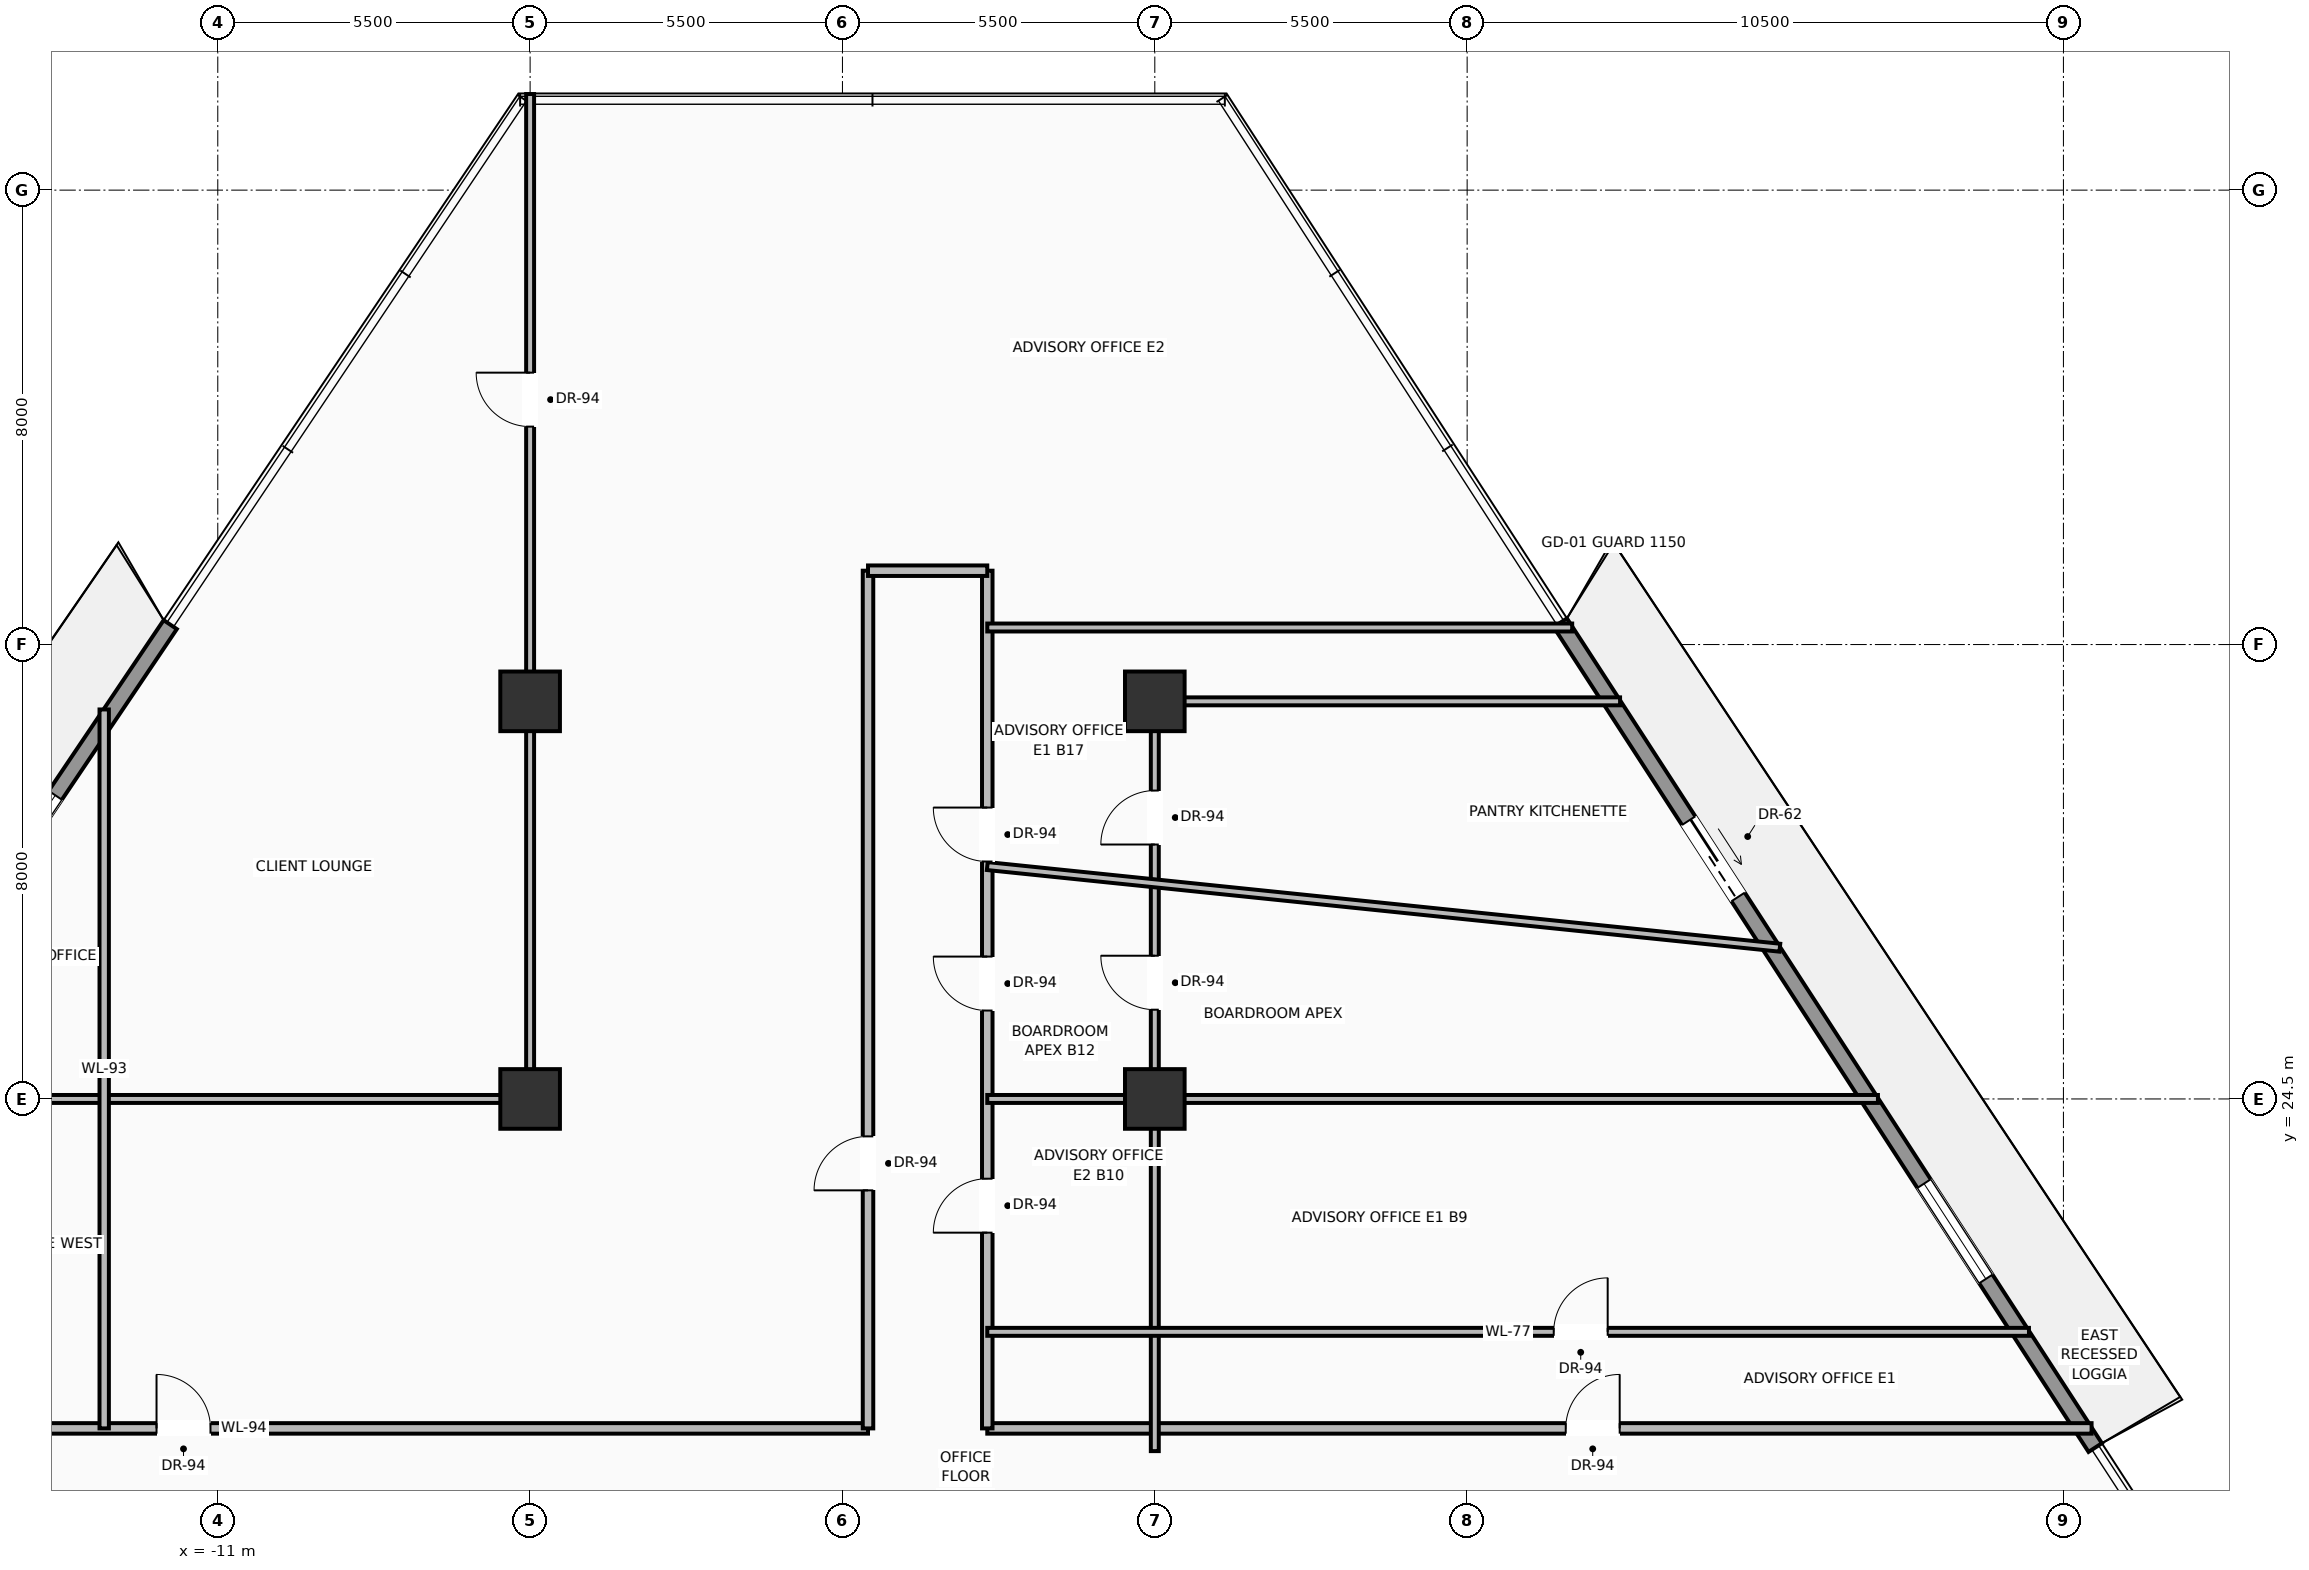
"""IFC4 building model, lengths in metres.
Left out: names, types, materials, properties, quantities, classifications, styles, units other than length and angle.
Written with IfcOpenShell. Run it as: python <this file> out.ifc"""

import sys

from ifc_helpers import new_model, si_unit, direction, frame, frame_2d, origin, origin_2d, place, context, subcontext, project, spatial, rectangle, extrude, source, transform, mapped, element, fill, save


model = new_model("IFC4")
c1 = context("Model", 3, precision=1e-05, world=origin(), true_north=direction((0.0, 1.0)))
c2 = subcontext(c1, "Body", "Model", "MODEL_VIEW")
j1 = project(units=[si_unit("LENGTHUNIT", "METRE"), si_unit("PLANEANGLEUNIT", "RADIAN")], contexts=[c1])
p1 = place(None, origin())
s1 = spatial("IfcSite", under=j1, at=p1, CompositionType="ELEMENT")
p2 = place(p1, origin())
s2 = spatial("IfcBuilding", under=s1, at=p2, CompositionType="ELEMENT")
p3 = place(p2, frame((0.0, 0.0, 91.4)))
s3 = spatial("IfcBuildingStorey", under=s2, at=p3, CompositionType="ELEMENT", Elevation=91.4)
m1 = source(origin(), c2, "Body", "SweptSolid", [
    extrude(rectangle(XDim=1.05, YDim=1.05, at=origin_2d()), origin(), (0.0, 0.0, 1.0), 3.7),
])
for number, where, z_axis, x_axis in (
    (1, (-5.5, 24.5, 0.0), (0.0, 0.0, 1.0), (1.0, 0.0, 0.0)),
    (2, (5.5, 24.5, 0.0), (0.0, 0.0, 1.0), (1.0, 0.0, 0.0)),
    (3, (-5.5, 31.5, 0.0), (0.0, 0.0, 1.0), (1.0, 0.0, 0.0)),
    (4, (5.5, 31.5, 0.0), (0.0, 0.0, 1.0), (1.0, 0.0, 0.0)),
):
    element("IfcColumn", number, at=place(p3, frame(where, z_axis=z_axis, x_axis=x_axis)), inside=s3, PredefinedType="COLUMN", context=c2, shape_type="MappedRepresentation", body=[
        mapped(m1, transform((0.0, 0.0, 0.0), scale=1.0)),
    ])
p4 = place(p3, frame((-21.654, 18.279, 0.0), z_axis=(0.0, 0.0, 1.0), x_axis=(0.558730690693, 0.829349151611, 0.0)))
e5 = element("IfcWall", 5, at=p4, inside=s3, PredefinedType="SOLIDWALL", context=c2, shape_type="SweptSolid", body=[
    extrude(rectangle(XDim=17.57, YDim=0.28, at=frame_2d((8.785, 0.0))), origin(), (0.0, 0.0, 1.0), 3.03),
])
p5 = place(p4, frame((4.217, 0.0, 0.0)))
e6 = element("IfcOpeningElement", 6, at=p5, cuts=e5, PredefinedType="OPENING", context=c2, shape_type="SweptSolid", body=[
    extrude(rectangle(XDim=1.6, YDim=2.35, at=frame_2d((0.8, 1.175))), frame((0.0, 0.15, 0.0), z_axis=(0.0, -1.0, 0.0), x_axis=(1.0, 0.0, 0.0)), (0.0, 0.0, 1.0), 0.3),
])
p6 = place(p4, frame((11.948, 0.0, 0.9)))
e7 = element("IfcOpeningElement", 7, at=p6, cuts=e5, PredefinedType="OPENING", context=c2, shape_type="SweptSolid", body=[
    extrude(rectangle(XDim=2.0, YDim=1.85, at=frame_2d((1.0, 0.925))), frame((0.0, 0.15, 0.0), z_axis=(0.0, -1.0, 0.0), x_axis=(1.0, 0.0, 0.0)), (0.0, 0.0, 1.0), 0.3),
])
p7 = place(p3, frame((12.64, 32.885, 0.0), z_axis=(0.0, 0.0, 1.0), x_axis=(0.544185470626, -0.838964941794, 0.0)))
e8 = element("IfcWall", 8, at=p7, inside=s3, PredefinedType="SOLIDWALL", context=c2, shape_type="SweptSolid", body=[
    extrude(rectangle(XDim=17.31, YDim=0.28, at=frame_2d((8.655, 0.0))), origin(), (0.0, 0.0, 1.0), 3.03),
])
p8 = place(p7, frame((4.154, 0.0, 0.0)))
e9 = element("IfcOpeningElement", 9, at=p8, cuts=e8, PredefinedType="OPENING", context=c2, shape_type="SweptSolid", body=[
    extrude(rectangle(XDim=1.6, YDim=2.35, at=frame_2d((0.8, 1.175))), frame((0.0, 0.15, 0.0), z_axis=(0.0, -1.0, 0.0), x_axis=(1.0, 0.0, 0.0)), (0.0, 0.0, 1.0), 0.3),
])
p9 = place(p7, frame((11.771, 0.0, 0.9)))
e10 = element("IfcOpeningElement", 10, at=p9, cuts=e8, PredefinedType="OPENING", context=c2, shape_type="SweptSolid", body=[
    extrude(rectangle(XDim=2.0, YDim=1.85, at=frame_2d((1.0, 0.925))), frame((0.0, 0.15, 0.0), z_axis=(0.0, -1.0, 0.0), x_axis=(1.0, 0.0, 0.0)), (0.0, 0.0, 1.0), 0.3),
])
p10 = place(p3, frame((-21.527, 18.7, 0.0), z_axis=(0.0, 0.0, 1.0), x_axis=(1.0, 0.0, 0.0)))
e11 = element("IfcWall", 11, at=p10, inside=s3, PredefinedType="PARTITIONING", context=c2, shape_type="SweptSolid", body=[
    extrude(rectangle(XDim=21.977, YDim=0.185, at=frame_2d((10.989, 0.0))), origin(), (0.0, 0.0, 1.0), 2.747),
])
p11 = place(p10, frame((9.449, 0.0, 0.0)))
e12 = element("IfcOpeningElement", 12, at=p11, cuts=e11, PredefinedType="OPENING", context=c2, shape_type="SweptSolid", body=[
    extrude(rectangle(XDim=0.95, YDim=2.2, at=frame_2d((0.475, 1.1))), frame((0.0, 0.103, 0.0), z_axis=(0.0, -1.0, 0.0), x_axis=(1.0, 0.0, 0.0)), (0.0, 0.0, 1.0), 0.205),
])
p12 = place(p10, frame((4.144, 0.0, 0.0)))
e13 = element("IfcOpeningElement", 13, at=p12, cuts=e11, PredefinedType="OPENING", context=c2, shape_type="SweptSolid", body=[
    extrude(rectangle(XDim=0.95, YDim=2.2, at=frame_2d((0.475, 1.1))), frame((0.0, 0.103, 0.0), z_axis=(0.0, -1.0, 0.0), x_axis=(1.0, 0.0, 0.0)), (0.0, 0.0, 1.0), 0.205),
])
p13 = place(p3, frame((2.55, 18.7, 0.0), z_axis=(0.0, 0.0, 1.0), x_axis=(1.0, 0.0, 0.0)))
e14 = element("IfcWall", 14, at=p13, inside=s3, PredefinedType="PARTITIONING", context=c2, shape_type="SweptSolid", body=[
    extrude(rectangle(XDim=19.446, YDim=0.185, at=frame_2d((9.723, 0.0))), origin(), (0.0, 0.0, 1.0), 2.747),
])
p14 = place(p13, frame((10.186, 0.0, 0.0)))
e15 = element("IfcOpeningElement", 15, at=p14, cuts=e14, PredefinedType="OPENING", context=c2, shape_type="SweptSolid", body=[
    extrude(rectangle(XDim=0.95, YDim=2.2, at=frame_2d((0.475, 1.1))), frame((0.0, 0.103, 0.0), z_axis=(0.0, -1.0, 0.0), x_axis=(1.0, 0.0, 0.0)), (0.0, 0.0, 1.0), 0.205),
])
p15 = place(p3, frame((0.45, 18.7, 0.0), z_axis=(0.0, 0.0, 1.0), x_axis=(0.0, 1.0, 0.0)))
e16 = element("IfcWall", 16, at=p15, inside=s3, PredefinedType="PARTITIONING", context=c2, shape_type="SweptSolid", body=[
    extrude(rectangle(XDim=15.1, YDim=0.185, at=frame_2d((7.55, 0.0))), origin(), (0.0, 0.0, 1.0), 2.747),
])
p16 = place(p15, frame((4.191, 0.0, 0.0)))
e17 = element("IfcOpeningElement", 17, at=p16, cuts=e16, PredefinedType="OPENING", context=c2, shape_type="SweptSolid", body=[
    extrude(rectangle(XDim=0.95, YDim=2.2, at=frame_2d((0.475, 1.1))), frame((0.0, 0.103, 0.0), z_axis=(0.0, -1.0, 0.0), x_axis=(1.0, 0.0, 0.0)), (0.0, 0.0, 1.0), 0.205),
])
p17 = place(p3, frame((2.55, 18.7, 0.0), z_axis=(0.0, 0.0, 1.0), x_axis=(0.0, 1.0, 0.0)))
e18 = element("IfcWall", 18, at=p17, inside=s3, PredefinedType="PARTITIONING", context=c2, shape_type="SweptSolid", body=[
    extrude(rectangle(XDim=15.1, YDim=0.185, at=frame_2d((7.55, 0.0))), origin(), (0.0, 0.0, 1.0), 2.747),
])
p18 = place(p17, frame((9.98, 0.0, 0.0)))
e19 = element("IfcOpeningElement", 19, at=p18, cuts=e18, PredefinedType="OPENING", context=c2, shape_type="SweptSolid", body=[
    extrude(rectangle(XDim=0.95, YDim=2.2, at=frame_2d((0.475, 1.1))), frame((0.0, 0.103, 0.0), z_axis=(0.0, -1.0, 0.0), x_axis=(1.0, 0.0, 0.0)), (0.0, 0.0, 1.0), 0.205),
])
p19 = place(p17, frame((3.446, 0.0, 0.0)))
e20 = element("IfcOpeningElement", 20, at=p19, cuts=e18, PredefinedType="OPENING", context=c2, shape_type="SweptSolid", body=[
    extrude(rectangle(XDim=0.95, YDim=2.2, at=frame_2d((0.475, 1.1))), frame((0.0, 0.103, 0.0), z_axis=(0.0, -1.0, 0.0), x_axis=(1.0, 0.0, 0.0)), (0.0, 0.0, 1.0), 0.205),
])
p20 = place(p17, frame((7.356, 0.0, 0.0)))
e21 = element("IfcOpeningElement", 21, at=p20, cuts=e18, PredefinedType="OPENING", context=c2, shape_type="SweptSolid", body=[
    extrude(rectangle(XDim=0.95, YDim=2.2, at=frame_2d((0.475, 1.1))), frame((0.0, 0.103, 0.0), z_axis=(0.0, -1.0, 0.0), x_axis=(1.0, 0.0, 0.0)), (0.0, 0.0, 1.0), 0.205),
])
p21 = place(p3, frame((0.45, 33.8, 0.0), z_axis=(0.0, 0.0, 1.0), x_axis=(1.0, 0.0, 0.0)))
e22 = element("IfcWall", 22, at=p21, inside=s3, PredefinedType="PARTITIONING", context=c2, shape_type="SweptSolid", body=[
    extrude(rectangle(XDim=2.1, YDim=0.185, at=frame_2d((1.05, 0.0))), origin(), (0.0, 0.0, 1.0), 3.442),
])
p22 = place(p3, frame((-5.5, 24.5, 0.0), z_axis=(0.0, 0.0, 1.0), x_axis=(0.0, 1.0, 0.0)))
e23 = element("IfcWall", 23, at=p22, inside=s3, PredefinedType="PARTITIONING", context=c2, shape_type="SweptSolid", body=[
    extrude(rectangle(XDim=17.692, YDim=0.14, at=frame_2d((8.846, 0.0))), origin(), (0.0, 0.0, 1.0), 2.747),
])
p23 = place(p22, frame((11.837, 0.0, 0.0)))
e24 = element("IfcOpeningElement", 24, at=p23, cuts=e23, PredefinedType="OPENING", context=c2, shape_type="SweptSolid", body=[
    extrude(rectangle(XDim=0.95, YDim=2.2, at=frame_2d((0.475, 1.1))), frame((0.0, 0.08, 0.0), z_axis=(0.0, -1.0, 0.0), x_axis=(1.0, 0.0, 0.0)), (0.0, 0.0, 1.0), 0.16),
])
p24 = place(p3, frame((5.5, 18.3, 0.0), z_axis=(0.0, 0.0, 1.0), x_axis=(0.0, 1.0, 0.0)))
e25 = element("IfcWall", 25, at=p24, inside=s3, PredefinedType="PARTITIONING", context=c2, shape_type="SweptSolid", body=[
    extrude(rectangle(XDim=13.2, YDim=0.14, at=frame_2d((6.6, 0.0))), origin(), (0.0, 0.0, 1.0), 2.747),
])
p25 = place(p24, frame((10.679, 0.0, 0.0)))
e26 = element("IfcOpeningElement", 26, at=p25, cuts=e25, PredefinedType="OPENING", context=c2, shape_type="SweptSolid", body=[
    extrude(rectangle(XDim=0.95, YDim=2.2, at=frame_2d((0.475, 1.1))), frame((0.0, 0.08, 0.0), z_axis=(0.0, -1.0, 0.0), x_axis=(1.0, 0.0, 0.0)), (0.0, 0.0, 1.0), 0.16),
])
p26 = place(p24, frame((7.771, 0.0, 0.0)))
e27 = element("IfcOpeningElement", 27, at=p26, cuts=e25, PredefinedType="OPENING", context=c2, shape_type="SweptSolid", body=[
    extrude(rectangle(XDim=0.95, YDim=2.2, at=frame_2d((0.475, 1.1))), frame((0.0, 0.08, 0.0), z_axis=(0.0, -1.0, 0.0), x_axis=(1.0, 0.0, 0.0)), (0.0, 0.0, 1.0), 0.16),
])
p27 = place(p3, frame((-17.62, 24.5, 0.0), z_axis=(0.0, 0.0, 1.0), x_axis=(1.0, 0.0, 0.0)))
e28 = element("IfcWall", 28, at=p27, inside=s3, PredefinedType="PARTITIONING", context=c2, shape_type="SweptSolid", body=[
    extrude(rectangle(XDim=12.12, YDim=0.14, at=frame_2d((6.06, 0.0))), origin(), (0.0, 0.0, 1.0), 2.747),
])
p28 = place(p27, frame((2.181, 0.0, 0.0)))
e29 = element("IfcOpeningElement", 29, at=p28, cuts=e28, PredefinedType="OPENING", context=c2, shape_type="SweptSolid", body=[
    extrude(rectangle(XDim=0.95, YDim=2.2, at=frame_2d((0.475, 1.1))), frame((0.0, 0.08, 0.0), z_axis=(0.0, -1.0, 0.0), x_axis=(1.0, 0.0, 0.0)), (0.0, 0.0, 1.0), 0.16),
])
p29 = place(p3, frame((5.5, 31.5, 0.0), z_axis=(0.0, 0.0, 1.0), x_axis=(1.0, 0.0, 0.0)))
e30 = element("IfcWall", 30, at=p29, inside=s3, PredefinedType="PARTITIONING", context=c2, shape_type="SweptSolid", body=[
    extrude(rectangle(XDim=8.193, YDim=0.14, at=frame_2d((4.097, 0.0))), origin(), (0.0, 0.0, 1.0), 2.747),
])
p30 = place(p3, frame((2.55, 20.4, 0.0), z_axis=(0.0, 0.0, 1.0), x_axis=(1.0, 0.0, 0.0)))
e31 = element("IfcWall", 31, at=p30, inside=s3, PredefinedType="PARTITIONING", context=c2, shape_type="SweptSolid", body=[
    extrude(rectangle(XDim=18.343, YDim=0.14, at=frame_2d((9.171, 0.0))), origin(), (0.0, 0.0, 1.0), 2.747),
])
p31 = place(p30, frame((9.975, 0.0, 0.0)))
e32 = element("IfcOpeningElement", 32, at=p31, cuts=e31, PredefinedType="OPENING", context=c2, shape_type="SweptSolid", body=[
    extrude(rectangle(XDim=0.95, YDim=2.2, at=frame_2d((0.475, 1.1))), frame((0.0, 0.08, 0.0), z_axis=(0.0, -1.0, 0.0), x_axis=(1.0, 0.0, 0.0)), (0.0, 0.0, 1.0), 0.16),
])
p32 = place(p3, frame((2.55, 24.5, 0.0), z_axis=(0.0, 0.0, 1.0), x_axis=(1.0, 0.0, 0.0)))
e33 = element("IfcWall", 33, at=p32, inside=s3, PredefinedType="PARTITIONING", context=c2, shape_type="SweptSolid", body=[
    extrude(rectangle(XDim=15.683, YDim=0.14, at=frame_2d((7.842, 0.0))), origin(), (0.0, 0.0, 1.0), 2.747),
])
p33 = place(p3, frame((2.55, 28.6, 0.0), z_axis=(0.0, 0.0, 1.0), x_axis=(0.994737328003, -0.10245803179, 0.0)))
e34 = element("IfcWall", 34, at=p33, inside=s3, PredefinedType="PARTITIONING", context=c2, shape_type="SweptSolid", body=[
    extrude(rectangle(XDim=14.03, YDim=0.14, at=frame_2d((7.015, 0.0))), origin(), (0.0, 0.0, 1.0), 2.747),
])
p34 = place(p3, frame((2.55, 32.8, 0.0), z_axis=(0.0, 0.0, 1.0), x_axis=(1.0, 0.0, 0.0)))
e35 = element("IfcWall", 35, at=p34, inside=s3, PredefinedType="PARTITIONING", context=c2, shape_type="SweptSolid", body=[
    extrude(rectangle(XDim=10.3, YDim=0.14, at=frame_2d((5.15, 0.0))), origin(), (0.0, 0.0, 1.0), 2.747),
])
p35 = place(p3, frame((-13.0, 18.7, 0.0), z_axis=(0.0, 0.0, 1.0), x_axis=(0.0, 1.0, 0.0)))
e36 = element("IfcWall", 36, at=p35, inside=s3, PredefinedType="PARTITIONING", context=c2, shape_type="SweptSolid", body=[
    extrude(rectangle(XDim=12.657, YDim=0.165, at=frame_2d((6.329, 0.0))), origin(), (0.0, 0.0, 1.0), 2.747),
])
m2 = source(origin(), c2, "Body", "SweptSolid", [
    extrude(rectangle(XDim=2.0, YDim=1.85, at=frame_2d((1.0, 0.925))), frame((0.0, 0.03, 0.0), z_axis=(0.0, -1.0, 0.0), x_axis=(1.0, 0.0, 0.0)), (0.0, 0.0, 1.0), 0.06),
])
p36 = place(p6, origin())
e37 = element("IfcWindow", 37, at=p36, inside=s3, PartitioningType="SINGLE_PANEL", PredefinedType="WINDOW", context=c2, shape_type="MappedRepresentation", body=[
    mapped(m2, transform((0.0, 0.0, 0.0), scale=1.0)),
])
fill(e7, e37)
m3 = source(origin(), c2, "Body", "SweptSolid", [
    extrude(rectangle(XDim=1.6, YDim=2.35, at=frame_2d((0.8, 1.175))), frame((0.0, 0.025, 0.0), z_axis=(0.0, -1.0, 0.0), x_axis=(1.0, 0.0, 0.0)), (0.0, 0.0, 1.0), 0.05),
])
p37 = place(p8, origin())
e38 = element("IfcDoor", 38, at=p37, inside=s3, OperationType="SLIDING_TO_RIGHT", PredefinedType="DOOR", context=c2, shape_type="MappedRepresentation", body=[
    mapped(m3, transform((0.0, 0.0, 0.0), scale=1.0)),
])
fill(e9, e38)
p38 = place(p9, origin())
e39 = element("IfcWindow", 39, at=p38, inside=s3, PartitioningType="SINGLE_PANEL", PredefinedType="WINDOW", context=c2, shape_type="MappedRepresentation", body=[
    mapped(m2, transform((0.0, 0.0, 0.0), scale=1.0)),
])
fill(e10, e39)
m4 = source(origin(), c2, "Body", "SweptSolid", [
    extrude(rectangle(XDim=0.95, YDim=2.2, at=frame_2d((0.475, 1.1))), frame((0.0, 0.025, 0.0), z_axis=(0.0, -1.0, 0.0), x_axis=(1.0, 0.0, 0.0)), (0.0, 0.0, 1.0), 0.05),
])
p39 = place(p11, origin())
e40 = element("IfcDoor", 40, at=p39, inside=s3, OperationType="SINGLE_SWING_LEFT", PredefinedType="DOOR", context=c2, shape_type="MappedRepresentation", body=[
    mapped(m4, transform((0.0, 0.0, 0.0), scale=1.0)),
])
fill(e12, e40)
p40 = place(p14, origin())
e41 = element("IfcDoor", 41, at=p40, inside=s3, OperationType="SINGLE_SWING_RIGHT", PredefinedType="DOOR", context=c2, shape_type="MappedRepresentation", body=[
    mapped(m4, transform((0.0, 0.0, 0.0), scale=1.0)),
])
fill(e15, e41)
p41 = place(p16, origin())
e42 = element("IfcDoor", 42, at=p41, inside=s3, OperationType="SINGLE_SWING_LEFT", PredefinedType="DOOR", context=c2, shape_type="MappedRepresentation", body=[
    mapped(m4, transform((0.0, 0.0, 0.0), scale=1.0)),
])
fill(e17, e42)
p42 = place(p18, origin())
e43 = element("IfcDoor", 43, at=p42, inside=s3, OperationType="SINGLE_SWING_RIGHT", PredefinedType="DOOR", context=c2, shape_type="MappedRepresentation", body=[
    mapped(m4, transform((0.0, 0.0, 0.0), scale=1.0)),
])
fill(e19, e43)
p43 = place(p31, origin())
e44 = element("IfcDoor", 44, at=p43, inside=s3, OperationType="SINGLE_SWING_RIGHT", PredefinedType="DOOR", context=c2, shape_type="MappedRepresentation", body=[
    mapped(m4, transform((0.0, 0.0, 0.0), scale=1.0)),
])
fill(e32, e44)
p44 = place(p19, origin())
e45 = element("IfcDoor", 45, at=p44, inside=s3, OperationType="SINGLE_SWING_LEFT", PredefinedType="DOOR", context=c2, shape_type="MappedRepresentation", body=[
    mapped(m4, transform((0.0, 0.0, 0.0), scale=1.0)),
])
fill(e20, e45)
p45 = place(p20, origin())
e46 = element("IfcDoor", 46, at=p45, inside=s3, OperationType="SINGLE_SWING_RIGHT", PredefinedType="DOOR", context=c2, shape_type="MappedRepresentation", body=[
    mapped(m4, transform((0.0, 0.0, 0.0), scale=1.0)),
])
fill(e21, e46)
p46 = place(p25, origin())
e47 = element("IfcDoor", 47, at=p46, inside=s3, OperationType="SINGLE_SWING_LEFT", PredefinedType="DOOR", context=c2, shape_type="MappedRepresentation", body=[
    mapped(m4, transform((0.0, 0.0, 0.0), scale=1.0)),
])
fill(e26, e47)
p47 = place(p23, origin())
e48 = element("IfcDoor", 48, at=p47, inside=s3, OperationType="SINGLE_SWING_RIGHT", PredefinedType="DOOR", context=c2, shape_type="MappedRepresentation", body=[
    mapped(m4, transform((0.0, 0.0, 0.0), scale=1.0)),
])
fill(e24, e48)
p48 = place(p26, origin())
e49 = element("IfcDoor", 49, at=p48, inside=s3, OperationType="SINGLE_SWING_RIGHT", PredefinedType="DOOR", context=c2, shape_type="MappedRepresentation", body=[
    mapped(m4, transform((0.0, 0.0, 0.0), scale=1.0)),
])
fill(e27, e49)
save(model, sys.argv[1])
